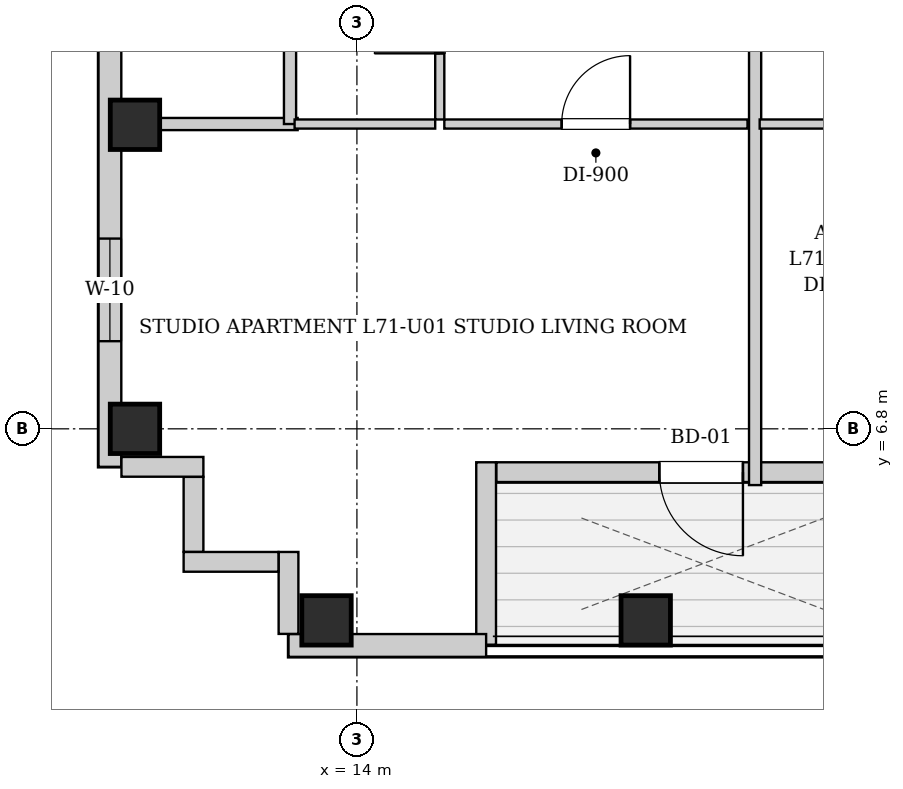
"""IFC4 building model, lengths in metres.
Left out: names, types, materials, properties, quantities, classifications, styles, units other than length and angle.
Written with IfcOpenShell. Run it as: python <this file> out.ifc"""

import sys

from ifc_helpers import new_model, si_unit, direction, frame, frame_2d, origin, origin_2d, place, context, subcontext, project, spatial, rectangle, extrude, element, fill, save


model = new_model("IFC4")
c1 = context("Model", 3, precision=1e-05, world=origin(), true_north=direction((0.0, 1.0)))
c2 = subcontext(c1, "Body", "Model", "MODEL_VIEW")
j1 = project(units=[si_unit("LENGTHUNIT", "METRE"), si_unit("PLANEANGLEUNIT", "RADIAN")], contexts=[c1])
p1 = place(None, origin())
s1 = spatial("IfcSite", under=j1, at=p1, CompositionType="ELEMENT")
p2 = place(p1, origin())
s2 = spatial("IfcBuilding", under=s1, at=p2, CompositionType="ELEMENT")
p3 = place(p2, frame((0.0, 0.0, 244.5)))
s3 = spatial("IfcBuildingStorey", under=s2, at=p3, CompositionType="ELEMENT", Elevation=244.5)
for number, where, z_axis, x_axis in (
    (1, (13.6, 4.28, 0.0), (0.0, 0.0, 1.0), (1.0, 0.0, 0.0)),
    (2, (17.8, 4.28, 0.0), (0.0, 0.0, 1.0), (1.0, 0.0, 0.0)),
    (3, (11.08, 6.8, 0.0), (0.0, 0.0, 1.0), (1.0, 0.0, 0.0)),
    (4, (11.08, 10.8, 0.0), (0.0, 0.0, 1.0), (1.0, 0.0, 0.0)),
):
    element("IfcColumn", number, at=place(p3, frame(where, z_axis=z_axis, x_axis=x_axis)), inside=s3, PredefinedType="COLUMN", context=c2, shape_type="SweptSolid", body=[
        extrude(rectangle(XDim=0.65, YDim=0.65, at=origin_2d()), origin(), (0.0, 0.0, 1.0), 3.4),
    ])
p4 = place(p3, frame((21.266, 6.23, 0.0), z_axis=(0.0, 0.0, 1.0), x_axis=(-1.0, 0.0, 0.0)))
e5 = element("IfcWall", 5, at=p4, inside=s3, PredefinedType="SOLIDWALL", context=c2, shape_type="SweptSolid", body=[
    extrude(rectangle(XDim=5.432, YDim=0.26, at=frame_2d((2.716, 0.0))), origin(), (0.0, 0.0, 1.0), 3.14),
])
p5 = place(p4, frame((2.187, 0.0, 0.0)))
e6 = element("IfcOpeningElement", 6, at=p5, cuts=e5, PredefinedType="OPENING", context=c2, shape_type="SweptSolid", body=[
    extrude(rectangle(XDim=1.1, YDim=2.0, at=frame_2d((0.55, 1.0))), frame((0.0, 0.14, 0.0), z_axis=(0.0, -1.0, 0.0), x_axis=(1.0, 0.0, 0.0)), (0.0, 0.0, 1.0), 0.28),
])
p6 = place(p3, frame((15.7, 6.36, 0.0), z_axis=(0.0, 0.0, 1.0), x_axis=(0.0, -1.0, 0.0)))
e7 = element("IfcWall", 7, at=p6, inside=s3, PredefinedType="SOLIDWALL", context=c2, shape_type="SweptSolid", body=[
    extrude(rectangle(XDim=2.4, YDim=0.26, at=frame_2d((1.2, 0.0))), origin(), (0.0, 0.0, 1.0), 3.14),
])
p7 = place(p3, frame((15.7, 3.95, 0.0), z_axis=(0.0, 0.0, 1.0), x_axis=(-1.0, 0.0, 0.0)))
e8 = element("IfcWall", 8, at=p7, inside=s3, PredefinedType="SOLIDWALL", context=c2, shape_type="SweptSolid", body=[
    extrude(rectangle(XDim=2.6, YDim=0.3, at=frame_2d((1.3, 0.0))), origin(), (0.0, 0.0, 1.0), 3.14),
])
p8 = place(p3, frame((10.75, 6.3, 0.0), z_axis=(0.0, 0.0, 1.0), x_axis=(0.0, 1.0, 0.0)))
e9 = element("IfcWall", 9, at=p8, inside=s3, PredefinedType="SOLIDWALL", context=c2, shape_type="SweptSolid", body=[
    extrude(rectangle(XDim=31.4, YDim=0.3, at=frame_2d((15.7, 0.0))), origin(), (0.0, 0.0, 1.0), 3.14),
])
p9 = place(p8, frame((1.653, 0.0, 0.55)))
e10 = element("IfcOpeningElement", 10, at=p9, cuts=e9, PredefinedType="OPENING", context=c2, shape_type="SweptSolid", body=[
    extrude(rectangle(XDim=1.35, YDim=1.2, at=frame_2d((0.675, 0.6))), frame((0.0, 0.16, 0.0), z_axis=(0.0, -1.0, 0.0), x_axis=(1.0, 0.0, 0.0)), (0.0, 0.0, 1.0), 0.32),
])
p10 = place(p8, frame((11.194, 0.0, 0.55)))
e11 = element("IfcOpeningElement", 11, at=p10, cuts=e9, PredefinedType="OPENING", context=c2, shape_type="SweptSolid", body=[
    extrude(rectangle(XDim=1.35, YDim=1.2, at=frame_2d((0.675, 0.6))), frame((0.0, 0.16, 0.0), z_axis=(0.0, -1.0, 0.0), x_axis=(1.0, 0.0, 0.0)), (0.0, 0.0, 1.0), 0.32),
])
p11 = place(p8, frame((9.185, 0.0, 0.55)))
e12 = element("IfcOpeningElement", 12, at=p11, cuts=e9, PredefinedType="OPENING", context=c2, shape_type="SweptSolid", body=[
    extrude(rectangle(XDim=1.35, YDim=1.2, at=frame_2d((0.675, 0.6))), frame((0.0, 0.16, 0.0), z_axis=(0.0, -1.0, 0.0), x_axis=(1.0, 0.0, 0.0)), (0.0, 0.0, 1.0), 0.32),
])
p12 = place(p8, frame((18.2, 0.0, 0.55)))
e13 = element("IfcOpeningElement", 13, at=p12, cuts=e9, PredefinedType="OPENING", context=c2, shape_type="SweptSolid", body=[
    extrude(rectangle(XDim=1.35, YDim=1.2, at=frame_2d((0.675, 0.6))), frame((0.0, 0.16, 0.0), z_axis=(0.0, -1.0, 0.0), x_axis=(1.0, 0.0, 0.0)), (0.0, 0.0, 1.0), 0.32),
])
p13 = place(p8, frame((19.81, 0.0, 0.55)))
e14 = element("IfcOpeningElement", 14, at=p13, cuts=e9, PredefinedType="OPENING", context=c2, shape_type="SweptSolid", body=[
    extrude(rectangle(XDim=1.35, YDim=1.2, at=frame_2d((0.675, 0.6))), frame((0.0, 0.16, 0.0), z_axis=(0.0, -1.0, 0.0), x_axis=(1.0, 0.0, 0.0)), (0.0, 0.0, 1.0), 0.32),
])
p14 = place(p3, frame((13.1, 4.102, 0.0), z_axis=(0.0, 0.0, 1.0), x_axis=(0.0, 1.0, 0.0)))
e15 = element("IfcWall", 15, at=p14, inside=s3, PredefinedType="SOLIDWALL", context=c2, shape_type="SweptSolid", body=[
    extrude(rectangle(XDim=1.078, YDim=0.26, at=frame_2d((0.539, 0.0))), origin(), (0.0, 0.0, 1.0), 3.14),
])
p15 = place(p3, frame((12.968, 5.05, 0.0), z_axis=(0.0, 0.0, 1.0), x_axis=(-1.0, 0.0, 0.0)))
e16 = element("IfcWall", 16, at=p15, inside=s3, PredefinedType="SOLIDWALL", context=c2, shape_type="SweptSolid", body=[
    extrude(rectangle(XDim=1.248, YDim=0.26, at=frame_2d((0.624, 0.0))), origin(), (0.0, 0.0, 1.0), 3.14),
])
p16 = place(p3, frame((11.85, 5.182, 0.0), z_axis=(0.0, 0.0, 1.0), x_axis=(0.0, 1.0, 0.0)))
e17 = element("IfcWall", 17, at=p16, inside=s3, PredefinedType="SOLIDWALL", context=c2, shape_type="SweptSolid", body=[
    extrude(rectangle(XDim=0.986, YDim=0.26, at=frame_2d((0.493, 0.0))), origin(), (0.0, 0.0, 1.0), 3.14),
])
p17 = place(p3, frame((11.98, 6.3, 0.0), z_axis=(0.0, 0.0, 1.0), x_axis=(-1.0, 0.0, 0.0)))
e18 = element("IfcWall", 18, at=p17, inside=s3, PredefinedType="SOLIDWALL", context=c2, shape_type="SweptSolid", body=[
    extrude(rectangle(XDim=1.078, YDim=0.26, at=frame_2d((0.539, 0.0))), origin(), (0.0, 0.0, 1.0), 3.14),
])
p18 = place(p3, frame((10.88, 10.81, 0.0), z_axis=(0.0, 0.0, 1.0), x_axis=(1.0, 0.0, 0.0)))
e19 = element("IfcWall", 19, at=p18, inside=s3, PredefinedType="PARTITIONING", context=c2, shape_type="SweptSolid", body=[
    extrude(rectangle(XDim=2.34, YDim=0.16, at=frame_2d((1.17, 0.0))), origin(), (0.0, 0.0, 1.0), 3.14),
])
p19 = place(p3, frame((13.12, 10.81, 0.0), z_axis=(0.0, 0.0, 1.0), x_axis=(0.0, 1.0, 0.0)))
e20 = element("IfcWall", 20, at=p19, inside=s3, PredefinedType="PARTITIONING", context=c2, shape_type="SweptSolid", body=[
    extrude(rectangle(XDim=2.66, YDim=0.16, at=frame_2d((1.33, 0.0))), origin(), (0.0, 0.0, 1.0), 3.14),
])
p20 = place(p3, frame((15.09, 10.87, 0.0), z_axis=(0.0, 0.0, 1.0), x_axis=(0.0, 1.0, 0.0)))
e21 = element("IfcWall", 21, at=p20, inside=s3, PredefinedType="PARTITIONING", context=c2, shape_type="SweptSolid", body=[
    extrude(rectangle(XDim=2.6, YDim=0.12, at=frame_2d((1.3, 0.0))), origin(), (0.0, 0.0, 1.0), 3.14),
])
p21 = place(p20, frame((0.87, 0.0, 0.0)))
e22 = element("IfcOpeningElement", 22, at=p21, cuts=e21, PredefinedType="OPENING", context=c2, shape_type="SweptSolid", body=[
    extrude(rectangle(XDim=0.86, YDim=2.05, at=frame_2d((0.43, 1.025))), frame((0.0, 0.07, 0.0), z_axis=(0.0, -1.0, 0.0), x_axis=(1.0, 0.0, 0.0)), (0.0, 0.0, 1.0), 0.14),
])
p22 = place(p3, frame((13.18, 10.81, 0.0), z_axis=(0.0, 0.0, 1.0), x_axis=(1.0, 0.0, 0.0)))
e23 = element("IfcWall", 23, at=p22, inside=s3, PredefinedType="PARTITIONING", context=c2, shape_type="SweptSolid", body=[
    extrude(rectangle(XDim=1.85, YDim=0.12, at=frame_2d((0.925, 0.0))), origin(), (0.0, 0.0, 1.0), 3.14),
])
p23 = place(p3, frame((15.15, 10.81, 0.0), z_axis=(0.0, 0.0, 1.0), x_axis=(1.0, 0.0, 0.0)))
e24 = element("IfcWall", 24, at=p23, inside=s3, PredefinedType="PARTITIONING", context=c2, shape_type="SweptSolid", body=[
    extrude(rectangle(XDim=3.989, YDim=0.12, at=frame_2d((1.995, 0.0))), origin(), (0.0, 0.0, 1.0), 3.14),
])
p24 = place(p23, frame((1.544, 0.0, 0.0)))
e25 = element("IfcOpeningElement", 25, at=p24, cuts=e24, PredefinedType="OPENING", context=c2, shape_type="SweptSolid", body=[
    extrude(rectangle(XDim=0.9, YDim=2.05, at=frame_2d((0.45, 1.025))), frame((0.0, 0.07, 0.0), z_axis=(0.0, -1.0, 0.0), x_axis=(1.0, 0.0, 0.0)), (0.0, 0.0, 1.0), 0.14),
])
p25 = place(p3, frame((19.239, 6.06, 0.0), z_axis=(0.0, 0.0, 1.0), x_axis=(0.0, 1.0, 0.0)))
e26 = element("IfcWall", 26, at=p25, inside=s3, PredefinedType="PARTITIONING", context=c2, shape_type="SweptSolid", body=[
    extrude(rectangle(XDim=7.41, YDim=0.16, at=frame_2d((3.705, 0.0))), origin(), (0.0, 0.0, 1.0), 3.14),
])
p26 = place(p3, frame((19.299, 10.81, 0.0), z_axis=(0.0, 0.0, 1.0), x_axis=(1.0, 0.0, 0.0)))
e27 = element("IfcWall", 27, at=p26, inside=s3, PredefinedType="PARTITIONING", context=c2, shape_type="SweptSolid", body=[
    extrude(rectangle(XDim=2.4, YDim=0.12, at=frame_2d((1.2, 0.0))), origin(), (0.0, 0.0, 1.0), 3.14),
])
p27 = place(p21, origin())
e28 = element("IfcDoor", 28, at=p27, inside=s3, OperationType="SINGLE_SWING_LEFT", PredefinedType="DOOR", context=c2, shape_type="SweptSolid", body=[
    extrude(rectangle(XDim=0.86, YDim=2.05, at=frame_2d((0.43, 1.025))), frame((0.0, 0.025, 0.0), z_axis=(0.0, -1.0, 0.0), x_axis=(1.0, 0.0, 0.0)), (0.0, 0.0, 1.0), 0.05),
])
fill(e22, e28)
p28 = place(p24, origin())
e29 = element("IfcDoor", 29, at=p28, inside=s3, OperationType="SINGLE_SWING_RIGHT", PredefinedType="DOOR", context=c2, shape_type="SweptSolid", body=[
    extrude(rectangle(XDim=0.9, YDim=2.05, at=frame_2d((0.45, 1.025))), frame((0.0, 0.025, 0.0), z_axis=(0.0, -1.0, 0.0), x_axis=(1.0, 0.0, 0.0)), (0.0, 0.0, 1.0), 0.05),
])
fill(e25, e29)
p29 = place(p5, origin())
e30 = element("IfcDoor", 30, at=p29, inside=s3, OperationType="SINGLE_SWING_LEFT", PredefinedType="DOOR", context=c2, shape_type="SweptSolid", body=[
    extrude(rectangle(XDim=1.1, YDim=2.0, at=frame_2d((0.55, 1.0))), frame((0.0, 0.025, 0.0), z_axis=(0.0, -1.0, 0.0), x_axis=(1.0, 0.0, 0.0)), (0.0, 0.0, 1.0), 0.05),
])
fill(e6, e30)
p30 = place(p9, origin())
e31 = element("IfcWindow", 31, at=p30, inside=s3, PartitioningType="SINGLE_PANEL", PredefinedType="WINDOW", context=c2, shape_type="SweptSolid", body=[
    extrude(rectangle(XDim=1.35, YDim=1.2, at=frame_2d((0.675, 0.6))), frame((0.0, 0.03, 0.0), z_axis=(0.0, -1.0, 0.0), x_axis=(1.0, 0.0, 0.0)), (0.0, 0.0, 1.0), 0.06),
])
fill(e10, e31)
save(model, sys.argv[1])
